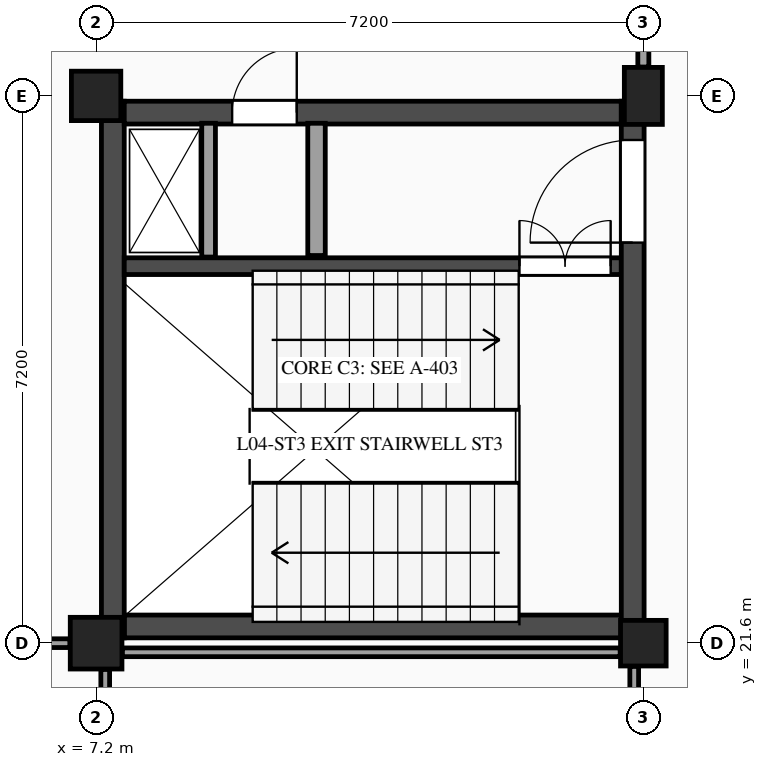
"""IFC4 building model, lengths in metres.
Left out: names, types, materials, properties, quantities, classifications, styles, units other than length and angle.
Written with IfcOpenShell. Run it as: python <this file> out.ifc"""

import sys

from ifc_helpers import new_model, si_unit, direction, frame, frame_2d, origin, origin_2d, place, context, subcontext, project, spatial, rectangle, extrude, element, fill, save


model = new_model("IFC4")
c1 = context("Model", 3, precision=1e-05, world=origin(), true_north=direction((0.0, 1.0)))
c2 = subcontext(c1, "Body", "Model", "MODEL_VIEW")
j1 = project(units=[si_unit("LENGTHUNIT", "METRE"), si_unit("PLANEANGLEUNIT", "RADIAN")], contexts=[c1])
p1 = place(None, origin())
s1 = spatial("IfcSite", under=j1, at=p1, CompositionType="ELEMENT")
p2 = place(p1, origin())
s2 = spatial("IfcBuilding", under=s1, at=p2, CompositionType="ELEMENT")
p3 = place(p2, frame((0.0, 0.0, 18.6)))
s3 = spatial("IfcBuildingStorey", under=s2, at=p3, CompositionType="ELEMENT", Elevation=18.6)
p4 = place(p3, frame((7.2, 21.6, 0.0), z_axis=(0.0, 0.0, 1.0), x_axis=(1.0, 0.0, 0.0)))
e1 = element("IfcColumn", 1, at=p4, inside=s3, PredefinedType="COLUMN", context=c2, shape_type="SweptSolid", body=[
    extrude(rectangle(XDim=0.68, YDim=0.68, at=origin_2d()), origin(), (0.0, 0.0, 1.0), 4.2),
])
p5 = place(p3, frame((7.2, 28.8, 0.0), z_axis=(0.0, 0.0, 1.0), x_axis=(1.0, 0.0, 0.0)))
e2 = element("IfcColumn", 2, at=p5, inside=s3, PredefinedType="COLUMN", context=c2, shape_type="SweptSolid", body=[
    extrude(rectangle(XDim=0.65, YDim=0.65, at=origin_2d()), origin(), (0.0, 0.0, 1.0), 4.2),
])
p6 = place(p3, frame((14.4, 21.6, 0.0), z_axis=(0.0, 0.0, 1.0), x_axis=(1.0, 0.0, 0.0)))
e3 = element("IfcColumn", 3, at=p6, inside=s3, PredefinedType="COLUMN", context=c2, shape_type="SweptSolid", body=[
    extrude(rectangle(XDim=0.6, YDim=0.6, at=origin_2d()), origin(), (0.0, 0.0, 1.0), 4.2),
])
p7 = place(p3, frame((14.4, 28.8, 0.0), z_axis=(0.0, 0.0, 1.0), x_axis=(1.0, 0.0, 0.0)))
e4 = element("IfcColumn", 4, at=p7, inside=s3, PredefinedType="COLUMN", context=c2, shape_type="SweptSolid", body=[
    extrude(rectangle(XDim=0.5, YDim=0.75, at=origin_2d()), origin(), (0.0, 0.0, 1.0), 4.2),
])
p8 = place(p3, frame((7.57, 21.82, 0.0), z_axis=(0.0, 0.0, 1.0), x_axis=(1.0, 0.0, 0.0)))
e5 = element("IfcWall", 5, at=p8, inside=s3, PredefinedType="SHEAR", context=c2, shape_type="SweptSolid", body=[
    extrude(rectangle(XDim=6.54, YDim=0.3, at=frame_2d((3.27, 0.0))), origin(), (0.0, 0.0, 1.0), 3.955),
])
p9 = place(p3, frame((7.42, 28.73, 0.0), z_axis=(0.0, 0.0, 1.0), x_axis=(0.0, -1.0, 0.0)))
e6 = element("IfcWall", 6, at=p9, inside=s3, PredefinedType="SHEAR", context=c2, shape_type="SweptSolid", body=[
    extrude(rectangle(XDim=7.06, YDim=0.3, at=frame_2d((3.53, 0.0))), origin(), (0.0, 0.0, 1.0), 3.955),
])
p10 = place(p3, frame((7.57, 28.58, 0.0), z_axis=(0.0, 0.0, 1.0), x_axis=(1.0, 0.0, 0.0)))
e7 = element("IfcWall", 7, at=p10, inside=s3, PredefinedType="SHEAR", context=c2, shape_type="SweptSolid", body=[
    extrude(rectangle(XDim=6.54, YDim=0.3, at=frame_2d((3.27, 0.0))), origin(), (0.0, 0.0, 1.0), 3.955),
])
p11 = place(p10, frame((1.42, 0.0, 0.0)))
e8 = element("IfcOpeningElement", 8, at=p11, cuts=e7, PredefinedType="OPENING", context=c2, shape_type="SweptSolid", body=[
    extrude(rectangle(XDim=0.85, YDim=2.1, at=frame_2d((0.425, 1.05))), frame((0.0, 0.16, 0.0), z_axis=(0.0, -1.0, 0.0), x_axis=(1.0, 0.0, 0.0)), (0.0, 0.0, 1.0), 0.32),
])
p12 = place(p3, frame((7.57, 26.56, 0.0), z_axis=(0.0, 0.0, 1.0), x_axis=(1.0, 0.0, 0.0)))
e9 = element("IfcWall", 9, at=p12, inside=s3, PredefinedType="SHEAR", context=c2, shape_type="SweptSolid", body=[
    extrude(rectangle(XDim=6.54, YDim=0.22, at=frame_2d((3.27, 0.0))), origin(), (0.0, 0.0, 1.0), 3.955),
])
p13 = place(p12, frame((5.2, 0.0, 0.0)))
e10 = element("IfcOpeningElement", 10, at=p13, cuts=e9, PredefinedType="OPENING", context=c2, shape_type="SweptSolid", body=[
    extrude(rectangle(XDim=1.2, YDim=2.2, at=frame_2d((0.6, 1.1))), frame((0.0, 0.12, 0.0), z_axis=(0.0, -1.0, 0.0), x_axis=(1.0, 0.0, 0.0)), (0.0, 0.0, 1.0), 0.24),
])
p14 = place(p3, frame((10.1, 26.7, 0.0), z_axis=(0.0, 0.0, 1.0), x_axis=(0.0, 1.0, 0.0)))
e11 = element("IfcWall", 11, at=p14, inside=s3, PredefinedType="PARTITIONING", context=c2, shape_type="SweptSolid", body=[
    extrude(rectangle(XDim=1.74, YDim=0.23, at=frame_2d((0.87, 0.0))), origin(), (0.0, 0.0, 1.0), 3.955),
])
p15 = place(p3, frame((8.68, 26.68, 0.0), z_axis=(0.0, 0.0, 1.0), x_axis=(0.0, 1.0, 0.0)))
e12 = element("IfcWall", 12, at=p15, inside=s3, PredefinedType="PARTITIONING", context=c2, shape_type="SweptSolid", body=[
    extrude(rectangle(XDim=1.76, YDim=0.18, at=frame_2d((0.88, 0.0))), origin(), (0.0, 0.0, 1.0), 3.955),
])
p16 = place(p3, frame((14.26, 21.67, 0.0), z_axis=(0.0, 0.0, 1.0), x_axis=(0.0, 1.0, 0.0)))
e13 = element("IfcWall", 13, at=p16, inside=s3, PredefinedType="SHEAR", context=c2, shape_type="SweptSolid", body=[
    extrude(rectangle(XDim=7.06, YDim=0.3, at=frame_2d((3.53, 0.0))), origin(), (0.0, 0.0, 1.0), 3.955),
])
p17 = place(p16, frame((5.2, 0.0, 0.0)))
e14 = element("IfcOpeningElement", 14, at=p17, cuts=e13, PredefinedType="OPENING", context=c2, shape_type="SweptSolid", body=[
    extrude(rectangle(XDim=1.35, YDim=2.15, at=frame_2d((0.675, 1.075))), frame((0.0, 0.16, 0.0), z_axis=(0.0, -1.0, 0.0), x_axis=(1.0, 0.0, 0.0)), (0.0, 0.0, 1.0), 0.32),
])
p18 = place(p3, frame((7.545, 21.48, 0.0), z_axis=(0.0, 0.0, 1.0), x_axis=(1.0, 0.0, 0.0)))
e15 = element("IfcWall", 15, at=p18, inside=s3, PredefinedType="PARTITIONING", context=c2, shape_type="SweptSolid", body=[
    extrude(rectangle(XDim=6.55, YDim=0.115, at=frame_2d((3.275, 0.0))), origin(), (0.0, 0.0, 1.0), 3.255),
])
p19 = place(p3, frame((7.32, 14.725, 0.0), z_axis=(0.0, 0.0, 1.0), x_axis=(0.0, 1.0, 0.0)))
e16 = element("IfcWall", 16, at=p19, inside=s3, PredefinedType="PARTITIONING", context=c2, shape_type="SweptSolid", body=[
    extrude(rectangle(XDim=6.53, YDim=0.115, at=frame_2d((3.265, 0.0))), origin(), (0.0, 0.0, 1.0), 3.325),
])
p20 = place(p3, frame((14.28, 14.715, 0.0), z_axis=(0.0, 0.0, 1.0), x_axis=(0.0, 1.0, 0.0)))
e17 = element("IfcWall", 17, at=p20, inside=s3, PredefinedType="PARTITIONING", context=c2, shape_type="SweptSolid", body=[
    extrude(rectangle(XDim=6.58, YDim=0.115, at=frame_2d((3.29, 0.0))), origin(), (0.0, 0.0, 1.0), 3.325),
])
p21 = place(p20, frame((0.685, 0.0, 0.0)))
e18 = element("IfcOpeningElement", 18, at=p21, cuts=e17, PredefinedType="OPENING", context=c2, shape_type="SweptSolid", body=[
    extrude(rectangle(XDim=0.95, YDim=2.1, at=frame_2d((0.475, 1.05))), frame((0.0, 0.067, 0.0), z_axis=(0.0, -1.0, 0.0), x_axis=(1.0, 0.0, 0.0)), (0.0, 0.0, 1.0), 0.135),
])
p22 = place(p20, frame((2.785, 0.0, 0.0)))
e19 = element("IfcOpeningElement", 19, at=p22, cuts=e17, PredefinedType="OPENING", context=c2, shape_type="SweptSolid", body=[
    extrude(rectangle(XDim=0.95, YDim=2.1, at=frame_2d((0.475, 1.05))), frame((0.0, 0.067, 0.0), z_axis=(0.0, -1.0, 0.0), x_axis=(1.0, 0.0, 0.0)), (0.0, 0.0, 1.0), 0.135),
])
p23 = place(p20, frame((4.935, 0.0, 0.0)))
e20 = element("IfcOpeningElement", 20, at=p23, cuts=e17, PredefinedType="OPENING", context=c2, shape_type="SweptSolid", body=[
    extrude(rectangle(XDim=1.0, YDim=2.15, at=frame_2d((0.5, 1.075))), frame((0.0, 0.067, 0.0), z_axis=(0.0, -1.0, 0.0), x_axis=(1.0, 0.0, 0.0)), (0.0, 0.0, 1.0), 0.135),
])
p24 = place(p3, frame((0.305, 21.6, 0.0), z_axis=(0.0, 0.0, 1.0), x_axis=(1.0, 0.0, 0.0)))
e21 = element("IfcWall", 21, at=p24, inside=s3, PredefinedType="PARTITIONING", context=c2, shape_type="SweptSolid", body=[
    extrude(rectangle(XDim=6.55, YDim=0.115, at=frame_2d((3.275, 0.0))), origin(), (0.0, 0.0, 1.0), 3.235),
])
p25 = place(p24, frame((2.535, 0.0, 0.0)))
e22 = element("IfcOpeningElement", 22, at=p25, cuts=e21, PredefinedType="OPENING", context=c2, shape_type="SweptSolid", body=[
    extrude(rectangle(XDim=1.48, YDim=2.28, at=frame_2d((0.74, 1.14))), frame((0.0, 0.067, 0.0), z_axis=(0.0, -1.0, 0.0), x_axis=(1.0, 0.0, 0.0)), (0.0, 0.0, 1.0), 0.135),
])
p26 = place(p3, frame((14.4, 29.18, 0.0), z_axis=(0.0, 0.0, 1.0), x_axis=(0.0, 1.0, 0.0)))
e23 = element("IfcWall", 23, at=p26, inside=s3, PredefinedType="PARTITIONING", context=c2, shape_type="SweptSolid", body=[
    extrude(rectangle(XDim=6.495, YDim=0.145, at=frame_2d((3.248, 0.0))), origin(), (0.0, 0.0, 1.0), 3.27),
])
p27 = place(p26, frame((2.698, 0.0, 0.0)))
e24 = element("IfcOpeningElement", 24, at=p27, cuts=e23, PredefinedType="OPENING", context=c2, shape_type="SweptSolid", body=[
    extrude(rectangle(XDim=1.1, YDim=2.15, at=frame_2d((0.55, 1.075))), frame((0.0, 0.083, 0.0), z_axis=(0.0, -1.0, 0.0), x_axis=(1.0, 0.0, 0.0)), (0.0, 0.0, 1.0), 0.165),
])
p28 = place(p11, origin())
e25 = element("IfcDoor", 25, at=p28, inside=s3, OperationType="SINGLE_SWING_RIGHT", PredefinedType="DOOR", context=c2, shape_type="SweptSolid", body=[
    extrude(rectangle(XDim=0.85, YDim=2.1, at=frame_2d((0.425, 1.05))), frame((0.0, 0.025, 0.0), z_axis=(0.0, -1.0, 0.0), x_axis=(1.0, 0.0, 0.0)), (0.0, 0.0, 1.0), 0.05),
])
fill(e8, e25)
p29 = place(p13, origin())
e26 = element("IfcDoor", 26, at=p29, inside=s3, OperationType="DOUBLE_DOOR_SINGLE_SWING", PredefinedType="DOOR", context=c2, shape_type="SweptSolid", body=[
    extrude(rectangle(XDim=1.2, YDim=2.2, at=frame_2d((0.6, 1.1))), frame((0.0, 0.025, 0.0), z_axis=(0.0, -1.0, 0.0), x_axis=(1.0, 0.0, 0.0)), (0.0, 0.0, 1.0), 0.05),
])
fill(e10, e26)
p30 = place(p17, origin())
e27 = element("IfcDoor", 27, at=p30, inside=s3, OperationType="SINGLE_SWING_LEFT", PredefinedType="DOOR", context=c2, shape_type="SweptSolid", body=[
    extrude(rectangle(XDim=1.35, YDim=2.15, at=frame_2d((0.675, 1.075))), frame((0.0, 0.025, 0.0), z_axis=(0.0, -1.0, 0.0), x_axis=(1.0, 0.0, 0.0)), (0.0, 0.0, 1.0), 0.05),
])
fill(e14, e27)
save(model, sys.argv[1])
